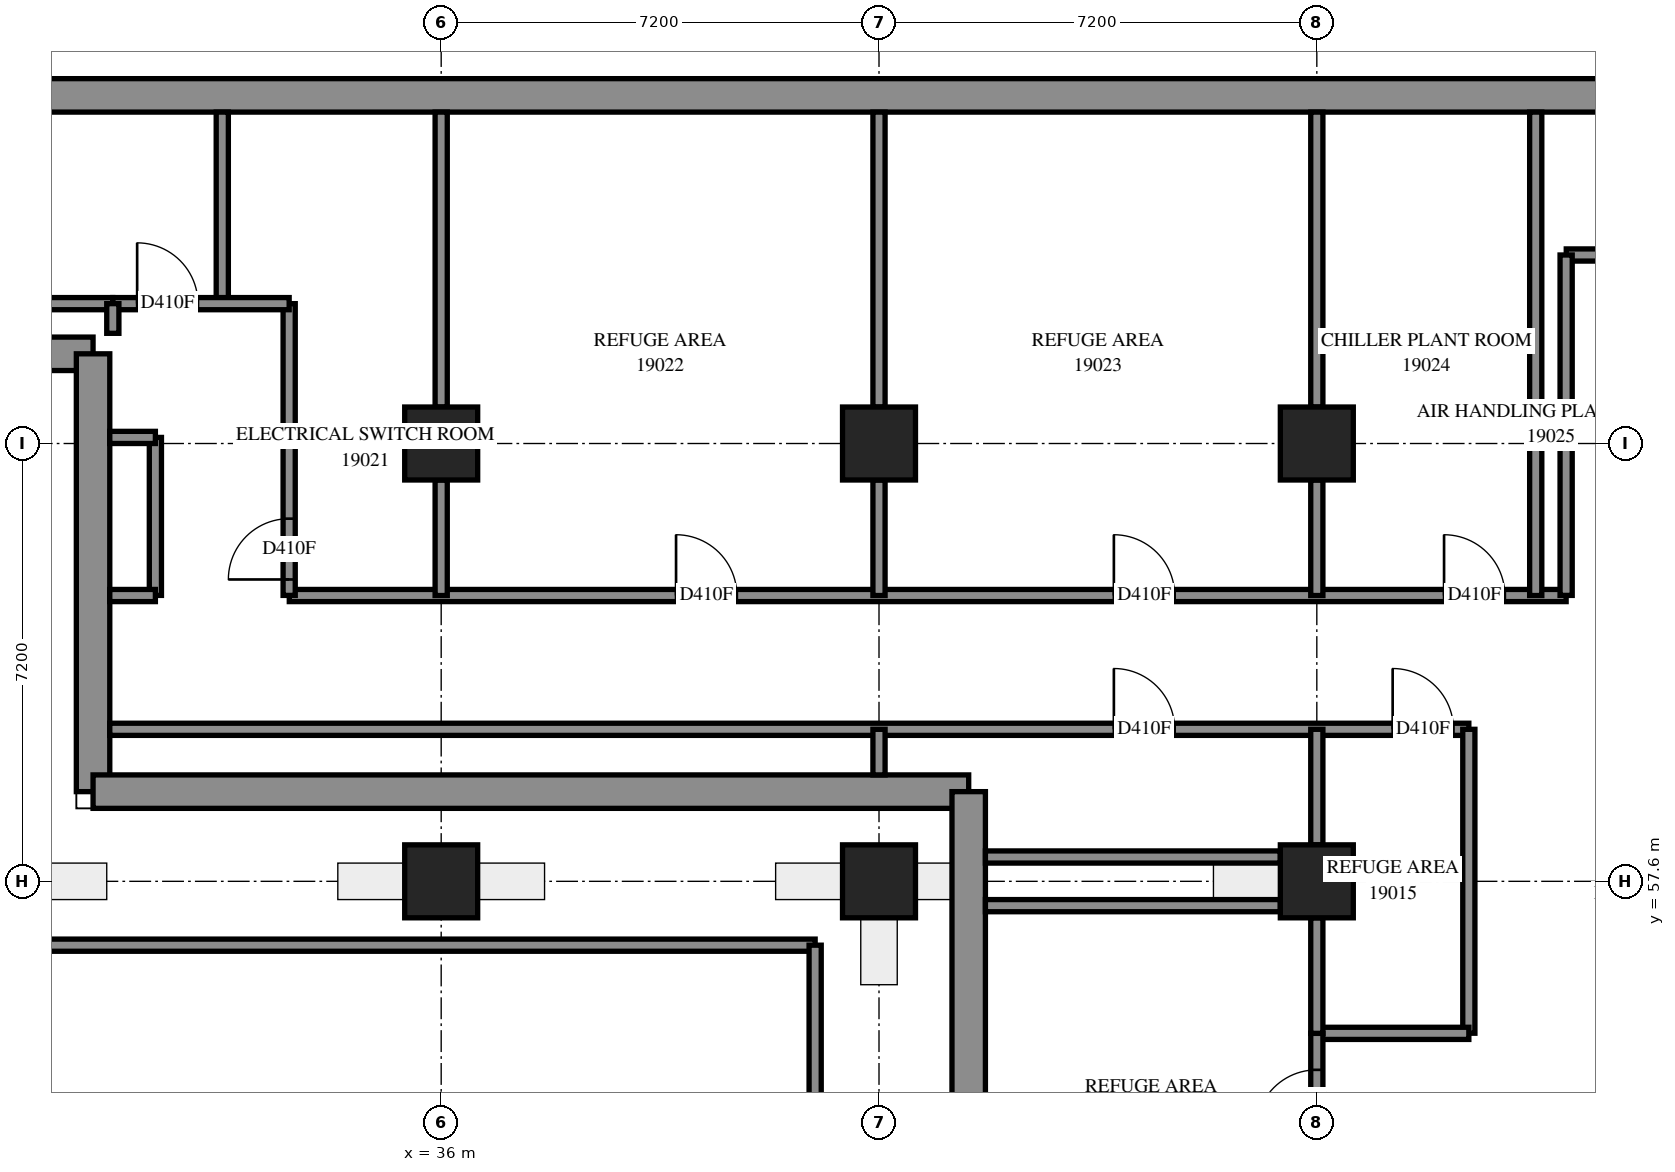
"""IFC4 building model, lengths in metres.
Left out: names, types, materials, properties, quantities, classifications, styles, units other than length and angle.
Written with IfcOpenShell. Run it as: python <this file> out.ifc"""

import sys

from ifc_helpers import new_model, si_unit, direction, frame, frame_2d, origin, origin_2d, place, context, subcontext, project, spatial, polyline, rectangle, outline, extrude, element, fill, save


model = new_model("IFC4")
c1 = context("Model", 3, precision=1e-05, world=origin(), true_north=direction((0.0, 1.0)))
c2 = subcontext(c1, "Body", "Model", "MODEL_VIEW")
j1 = project(units=[si_unit("LENGTHUNIT", "METRE"), si_unit("PLANEANGLEUNIT", "RADIAN")], contexts=[c1])
p1 = place(None, origin())
s1 = spatial("IfcSite", under=j1, at=p1, CompositionType="ELEMENT")
p2 = place(p1, origin())
s2 = spatial("IfcBuilding", under=s1, at=p2, CompositionType="ELEMENT")
p3 = place(p2, frame((0.0, 0.0, 72.0)))
s3 = spatial("IfcBuildingStorey", under=s2, at=p3, CompositionType="ELEMENT", Elevation=72.0)
p4 = place(p3, frame((36.0, 57.6, -0.3), z_axis=(0.0, 0.0, 1.0), x_axis=(1.0, 0.0, 0.0)))
e1 = element("IfcColumn", 1, at=p4, inside=s3, PredefinedType="COLUMN", context=c2, shape_type="SweptSolid", body=[
    extrude(rectangle(XDim=1.2, YDim=1.2, at=origin_2d()), origin(), (0.0, 0.0, 1.0), 5.0),
])
p5 = place(p3, frame((36.0, 64.8, 0.0), z_axis=(0.0, 0.0, 1.0), x_axis=(1.0, 0.0, 0.0)))
e2 = element("IfcColumn", 2, at=p5, inside=s3, PredefinedType="COLUMN", context=c2, shape_type="SweptSolid", body=[
    extrude(rectangle(XDim=1.2, YDim=1.2, at=origin_2d()), origin(), (0.0, 0.0, 1.0), 4.7),
])
p6 = place(p3, frame((43.2, 57.6, -0.3), z_axis=(0.0, 0.0, 1.0), x_axis=(1.0, 0.0, 0.0)))
e3 = element("IfcColumn", 3, at=p6, inside=s3, PredefinedType="COLUMN", context=c2, shape_type="SweptSolid", body=[
    extrude(rectangle(XDim=1.2, YDim=1.2, at=origin_2d()), origin(), (0.0, 0.0, 1.0), 5.0),
])
for number, where, z_axis, x_axis in (
    (4, (43.2, 64.8, 0.0), (0.0, 0.0, 1.0), (1.0, 0.0, 0.0)),
    (5, (50.4, 57.6, 0.0), (0.0, 0.0, 1.0), (1.0, 0.0, 0.0)),
    (6, (50.4, 64.8, 0.0), (0.0, 0.0, 1.0), (1.0, 0.0, 0.0)),
):
    element("IfcColumn", number, at=place(p3, frame(where, z_axis=z_axis, x_axis=x_axis)), inside=s3, PredefinedType="COLUMN", context=c2, shape_type="SweptSolid", body=[
        extrude(rectangle(XDim=1.2, YDim=1.2, at=origin_2d()), origin(), (0.0, 0.0, 1.0), 4.7),
    ])
p7 = place(p3, frame((78.589, 70.525, 0.0), z_axis=(0.0, 0.0, 1.0), x_axis=(-1.0, 0.0, 0.0)))
e7 = element("IfcWall", 7, at=p7, inside=s3, PredefinedType="SOLIDWALL", context=c2, shape_type="SweptSolid", body=[
    extrude(outline(polyline([(-0.114, -0.275), (55.789, -0.275), (55.239, 0.275), (0.114, 0.275), (-0.114, -0.275)])), origin(), (0.0, 0.0, 1.0), 4.7),
])
p8 = place(p3, frame((23.075, 66.275, 0.0), z_axis=(0.0, 0.0, 1.0), x_axis=(1.0, 0.0, 0.0)))
e8 = element("IfcWall", 8, at=p8, inside=s3, PredefinedType="SOLIDWALL", context=c2, shape_type="SweptSolid", body=[
    extrude(outline(polyline([(-0.275, -0.275), (6.925, -0.275), (7.475, 0.275), (0.275, 0.275), (-0.275, -0.275)])), origin(), (0.0, 0.0, 1.0), 4.7),
])
p9 = place(p3, frame((30.275, 66.275, 0.0), z_axis=(0.0, 0.0, 1.0), x_axis=(0.0, -1.0, 0.0)))
e9 = element("IfcWall", 9, at=p9, inside=s3, PredefinedType="SOLIDWALL", context=c2, shape_type="SweptSolid", body=[
    extrude(outline(polyline([(0.275, -0.275), (7.475, -0.275), (6.925, 0.275), (-0.275, 0.275), (0.275, -0.275)])), origin(), (0.0, 0.0, 1.0), 4.7),
])
p10 = place(p3, frame((30.275, 59.075, 0.0), z_axis=(0.0, 0.0, 1.0), x_axis=(1.0, 0.0, 0.0)))
e10 = element("IfcWall", 10, at=p10, inside=s3, PredefinedType="SOLIDWALL", context=c2, shape_type="SweptSolid", body=[
    extrude(outline(polyline([(-0.275, -0.275), (14.125, -0.275), (14.675, 0.275), (0.275, 0.275), (-0.275, -0.275)])), origin(), (0.0, 0.0, 1.0), 4.7),
])
p11 = place(p3, frame((44.675, 59.075, 0.0), z_axis=(0.0, 0.0, 1.0), x_axis=(0.0, -1.0, 0.0)))
e11 = element("IfcWall", 11, at=p11, inside=s3, PredefinedType="SOLIDWALL", context=c2, shape_type="SweptSolid", body=[
    extrude(outline(polyline([(0.275, -0.275), (7.475, -0.275), (6.925, 0.275), (-0.275, 0.275), (0.275, -0.275)])), origin(), (0.0, 0.0, 1.0), 4.7),
])
p12 = place(p3, frame((27.75, 56.55, 0.0), z_axis=(0.0, 0.0, 1.0), x_axis=(1.0, 0.0, 0.0)))
e12 = element("IfcWall", 12, at=p12, inside=s3, PredefinedType="SOLIDWALL", context=c2, shape_type="SweptSolid", body=[
    extrude(outline(polyline([(-0.1, -0.1), (14.3, -0.1), (14.5, 0.1), (0.1, 0.1), (-0.1, -0.1)])), origin(), (0.0, 0.0, 1.0), 4.7),
])
p13 = place(p3, frame((42.15, 56.55, 0.0), z_axis=(0.0, 0.0, 1.0), x_axis=(0.0, -1.0, 0.0)))
e13 = element("IfcWall", 13, at=p13, inside=s3, PredefinedType="SOLIDWALL", context=c2, shape_type="SweptSolid", body=[
    extrude(outline(polyline([(0.1, -0.1), (7.3, -0.1), (7.1, 0.1), (-0.1, 0.1), (0.1, -0.1)])), origin(), (0.0, 0.0, 1.0), 4.7),
])
p14 = place(p3, frame((30.55, 60.1, 0.0), z_axis=(0.0, 0.0, 1.0), x_axis=(1.0, 0.0, 0.0)))
e14 = element("IfcWall", 14, at=p14, inside=s3, PredefinedType="PARTITIONING", context=c2, shape_type="SweptSolid", body=[
    extrude(rectangle(XDim=22.35, YDim=0.2, at=frame_2d((11.175, 0.0))), origin(), (0.0, 0.0, 1.0), 4.7),
])
p15 = place(p14, frame((16.512, 0.0, 0.0)))
e15 = element("IfcOpeningElement", 15, at=p15, cuts=e14, PredefinedType="OPENING", context=c2, shape_type="SweptSolid", body=[
    extrude(rectangle(XDim=1.0, YDim=2.1, at=frame_2d((0.5, 1.05))), frame((0.0, 0.11, 0.0), z_axis=(0.0, -1.0, 0.0), x_axis=(1.0, 0.0, 0.0)), (0.0, 0.0, 1.0), 0.22),
])
p16 = place(p14, frame((21.097, 0.0, 0.0)))
e16 = element("IfcOpeningElement", 16, at=p16, cuts=e14, PredefinedType="OPENING", context=c2, shape_type="SweptSolid", body=[
    extrude(rectangle(XDim=1.0, YDim=2.1, at=frame_2d((0.5, 1.05))), frame((0.0, 0.11, 0.0), z_axis=(0.0, -1.0, 0.0), x_axis=(1.0, 0.0, 0.0)), (0.0, 0.0, 1.0), 0.22),
])
p17 = place(p3, frame((33.502, 62.3, 0.0), z_axis=(0.0, 0.0, 1.0), x_axis=(1.0, 0.0, 0.0)))
e17 = element("IfcWall", 17, at=p17, inside=s3, PredefinedType="PARTITIONING", context=c2, shape_type="SweptSolid", body=[
    extrude(rectangle(XDim=20.998, YDim=0.2, at=frame_2d((10.499, 0.0))), origin(), (0.0, 0.0, 1.0), 4.7),
])
p18 = place(p17, frame((6.361, 0.0, 0.0)))
e18 = element("IfcOpeningElement", 18, at=p18, cuts=e17, PredefinedType="OPENING", context=c2, shape_type="SweptSolid", body=[
    extrude(rectangle(XDim=1.0, YDim=2.1, at=frame_2d((0.5, 1.05))), frame((0.0, 0.11, 0.0), z_axis=(0.0, -1.0, 0.0), x_axis=(1.0, 0.0, 0.0)), (0.0, 0.0, 1.0), 0.22),
])
p19 = place(p17, frame((13.56, 0.0, 0.0)))
e19 = element("IfcOpeningElement", 19, at=p19, cuts=e17, PredefinedType="OPENING", context=c2, shape_type="SweptSolid", body=[
    extrude(rectangle(XDim=1.0, YDim=2.1, at=frame_2d((0.5, 1.05))), frame((0.0, 0.11, 0.0), z_axis=(0.0, -1.0, 0.0), x_axis=(1.0, 0.0, 0.0)), (0.0, 0.0, 1.0), 0.22),
])
p20 = place(p17, frame((18.991, 0.0, 0.0)))
e20 = element("IfcOpeningElement", 20, at=p20, cuts=e17, PredefinedType="OPENING", context=c2, shape_type="SweptSolid", body=[
    extrude(rectangle(XDim=1.0, YDim=2.1, at=frame_2d((0.5, 1.05))), frame((0.0, 0.11, 0.0), z_axis=(0.0, -1.0, 0.0), x_axis=(1.0, 0.0, 0.0)), (0.0, 0.0, 1.0), 0.22),
])
p21 = place(p3, frame((54.502, 67.9, 0.0), z_axis=(0.0, 0.0, 1.0), x_axis=(1.0, 0.0, 0.0)))
e21 = element("IfcWall", 21, at=p21, inside=s3, PredefinedType="PARTITIONING", context=c2, shape_type="SweptSolid", body=[
    extrude(rectangle(XDim=20.598, YDim=0.2, at=frame_2d((10.299, 0.0))), origin(), (0.0, 0.0, 1.0), 4.7),
])
p22 = place(p21, frame((1.871, 0.0, 0.0)))
e22 = element("IfcOpeningElement", 22, at=p22, cuts=e21, PredefinedType="OPENING", context=c2, shape_type="SweptSolid", body=[
    extrude(rectangle(XDim=1.0, YDim=2.1, at=frame_2d((0.5, 1.05))), frame((0.0, 0.11, 0.0), z_axis=(0.0, -1.0, 0.0), x_axis=(1.0, 0.0, 0.0)), (0.0, 0.0, 1.0), 0.22),
])
p23 = place(p21, frame((16.273, 0.0, 0.0)))
e23 = element("IfcOpeningElement", 23, at=p23, cuts=e21, PredefinedType="OPENING", context=c2, shape_type="SweptSolid", body=[
    extrude(rectangle(XDim=1.0, YDim=2.1, at=frame_2d((0.5, 1.05))), frame((0.0, 0.11, 0.0), z_axis=(0.0, -1.0, 0.0), x_axis=(1.0, 0.0, 0.0)), (0.0, 0.0, 1.0), 0.22),
])
p24 = place(p21, frame((9.036, 0.0, 0.0)))
e24 = element("IfcOpeningElement", 24, at=p24, cuts=e21, PredefinedType="OPENING", context=c2, shape_type="SweptSolid", body=[
    extrude(rectangle(XDim=1.0, YDim=2.1, at=frame_2d((0.5, 1.05))), frame((0.0, 0.11, 0.0), z_axis=(0.0, -1.0, 0.0), x_axis=(1.0, 0.0, 0.0)), (0.0, 0.0, 1.0), 0.22),
])
p25 = place(p3, frame((54.0, 62.3, 0.0), z_axis=(0.0, 0.0, 1.0), x_axis=(0.0, 1.0, 0.0)))
e25 = element("IfcWall", 25, at=p25, inside=s3, PredefinedType="PARTITIONING", context=c2, shape_type="SweptSolid", body=[
    extrude(rectangle(XDim=7.95, YDim=0.2, at=frame_2d((3.975, 0.0))), origin(), (0.0, 0.0, 1.0), 4.7),
])
p26 = place(p3, frame((23.35, 67.1, 0.0), z_axis=(0.0, 0.0, 1.0), x_axis=(1.0, 0.0, 0.0)))
e26 = element("IfcWall", 26, at=p26, inside=s3, PredefinedType="PARTITIONING", context=c2, shape_type="SweptSolid", body=[
    extrude(rectangle(XDim=7.25, YDim=0.2, at=frame_2d((3.625, 0.0))), origin(), (0.0, 0.0, 1.0), 4.7),
])
p27 = place(p3, frame((54.5, 62.302, 0.0), z_axis=(0.0, 0.0, 1.0), x_axis=(0.0, 1.0, 0.0)))
e27 = element("IfcWall", 27, at=p27, inside=s3, PredefinedType="PARTITIONING", context=c2, shape_type="SweptSolid", body=[
    extrude(rectangle(XDim=5.598, YDim=0.2, at=frame_2d((2.799, 0.0))), origin(), (0.0, 0.0, 1.0), 4.7),
])
p28 = place(p3, frame((52.9, 55.102, 0.0), z_axis=(0.0, 0.0, 1.0), x_axis=(0.0, 1.0, 0.0)))
e28 = element("IfcWall", 28, at=p28, inside=s3, PredefinedType="PARTITIONING", context=c2, shape_type="SweptSolid", body=[
    extrude(rectangle(XDim=4.998, YDim=0.2, at=frame_2d((2.499, 0.0))), origin(), (0.0, 0.0, 1.0), 4.7),
])
for number, where, z_axis, x_axis in (
    (29, (44.95, 57.2, 0.0), (0.0, 0.0, 1.0), (1.0, 0.0, 0.0)),
    (30, (44.95, 58.0, 0.0), (0.0, 0.0, 1.0), (1.0, 0.0, 0.0)),
    (31, (36.0, 65.4, 0.0), (0.0, 0.0, 1.0), (0.0, 1.0, 0.0)),
    (32, (43.2, 65.4, 0.0), (0.0, 0.0, 1.0), (0.0, 1.0, 0.0)),
    (33, (50.4, 65.4, 0.0), (0.0, 0.0, 1.0), (0.0, 1.0, 0.0)),
):
    element("IfcWall", number, at=place(p3, frame(where, z_axis=z_axis, x_axis=x_axis)), inside=s3, PredefinedType="PARTITIONING", context=c2, shape_type="SweptSolid", body=[
        extrude(rectangle(XDim=4.85, YDim=0.2, at=frame_2d((2.425, 0.0))), origin(), (0.0, 0.0, 1.0), 4.7),
    ])
p29 = place(p3, frame((33.5, 62.302, 0.0), z_axis=(0.0, 0.0, 1.0), x_axis=(0.0, 1.0, 0.0)))
e34 = element("IfcWall", 34, at=p29, inside=s3, PredefinedType="PARTITIONING", context=c2, shape_type="SweptSolid", body=[
    extrude(rectangle(XDim=4.798, YDim=0.2, at=frame_2d((2.399, 0.0))), origin(), (0.0, 0.0, 1.0), 4.7),
])
p30 = place(p29, frame((0.262, 0.0, 0.0)))
e35 = element("IfcOpeningElement", 35, at=p30, cuts=e34, PredefinedType="OPENING", context=c2, shape_type="SweptSolid", body=[
    extrude(rectangle(XDim=1.0, YDim=2.1, at=frame_2d((0.5, 1.05))), frame((0.0, 0.11, 0.0), z_axis=(0.0, -1.0, 0.0), x_axis=(1.0, 0.0, 0.0)), (0.0, 0.0, 1.0), 0.22),
])
p31 = place(p3, frame((32.4, 67.1, 0.0), z_axis=(0.0, 0.0, 1.0), x_axis=(0.0, 1.0, 0.0)))
e36 = element("IfcWall", 36, at=p31, inside=s3, PredefinedType="PARTITIONING", context=c2, shape_type="SweptSolid", body=[
    extrude(rectangle(XDim=3.15, YDim=0.2, at=frame_2d((1.575, 0.0))), origin(), (0.0, 0.0, 1.0), 4.7),
])
p32 = place(p3, frame((30.6, 67.1, 0.0), z_axis=(0.0, 0.0, 1.0), x_axis=(1.0, 0.0, 0.0)))
e37 = element("IfcWall", 37, at=p32, inside=s3, PredefinedType="PARTITIONING", context=c2, shape_type="SweptSolid", body=[
    extrude(rectangle(XDim=2.9, YDim=0.2, at=frame_2d((1.45, 0.0))), origin(), (0.0, 0.0, 1.0), 4.7),
])
p33 = place(p32, frame((0.4, 0.0, 0.0)))
e38 = element("IfcOpeningElement", 38, at=p33, cuts=e37, PredefinedType="OPENING", context=c2, shape_type="SweptSolid", body=[
    extrude(rectangle(XDim=1.0, YDim=2.1, at=frame_2d((0.5, 1.05))), frame((0.0, 0.11, 0.0), z_axis=(0.0, -1.0, 0.0), x_axis=(1.0, 0.0, 0.0)), (0.0, 0.0, 1.0), 0.22),
])
p34 = place(p3, frame((31.3, 62.302, 0.0), z_axis=(0.0, 0.0, 1.0), x_axis=(0.0, 1.0, 0.0)))
e39 = element("IfcWall", 39, at=p34, inside=s3, PredefinedType="PARTITIONING", context=c2, shape_type="SweptSolid", body=[
    extrude(rectangle(XDim=2.598, YDim=0.2, at=frame_2d((1.299, 0.0))), origin(), (0.0, 0.0, 1.0), 4.7),
])
p35 = place(p3, frame((50.4, 55.1, 0.0), z_axis=(0.0, 0.0, 1.0), x_axis=(1.0, 0.0, 0.0)))
e40 = element("IfcWall", 40, at=p35, inside=s3, PredefinedType="PARTITIONING", context=c2, shape_type="SweptSolid", body=[
    extrude(rectangle(XDim=2.5, YDim=0.2, at=frame_2d((1.25, 0.0))), origin(), (0.0, 0.0, 1.0), 4.7),
])
p36 = place(p3, frame((50.4, 52.9, 0.0), z_axis=(0.0, 0.0, 1.0), x_axis=(0.0, 1.0, 0.0)))
e41 = element("IfcWall", 41, at=p36, inside=s3, PredefinedType="PARTITIONING", context=c2, shape_type="SweptSolid", body=[
    extrude(rectangle(XDim=2.2, YDim=0.2, at=frame_2d((1.1, 0.0))), origin(), (0.0, 0.0, 1.0), 4.7),
])
p37 = place(p36, frame((0.6, 0.0, 0.0)))
e42 = element("IfcOpeningElement", 42, at=p37, cuts=e41, PredefinedType="OPENING", context=c2, shape_type="SweptSolid", body=[
    extrude(rectangle(XDim=1.0, YDim=2.1, at=frame_2d((0.5, 1.05))), frame((0.0, 0.11, 0.0), z_axis=(0.0, -1.0, 0.0), x_axis=(1.0, 0.0, 0.0)), (0.0, 0.0, 1.0), 0.22),
])
for number, where, z_axis, x_axis in (
    (43, (36.0, 62.3, 0.0), (0.0, 0.0, 1.0), (0.0, 1.0, 0.0)),
    (44, (43.2, 62.3, 0.0), (0.0, 0.0, 1.0), (0.0, 1.0, 0.0)),
    (45, (50.4, 62.3, 0.0), (0.0, 0.0, 1.0), (0.0, 1.0, 0.0)),
    (46, (50.4, 55.1, 0.0), (0.0, 0.0, 1.0), (0.0, 1.0, 0.0)),
    (47, (50.4, 58.2, 0.0), (0.0, 0.0, 1.0), (0.0, 1.0, 0.0)),
):
    element("IfcWall", number, at=place(p3, frame(where, z_axis=z_axis, x_axis=x_axis)), inside=s3, PredefinedType="PARTITIONING", context=c2, shape_type="SweptSolid", body=[
        extrude(rectangle(XDim=1.9, YDim=0.2, at=frame_2d((0.95, 0.0))), origin(), (0.0, 0.0, 1.0), 4.7),
    ])
for number, where, z_axis, x_axis in (
    (48, (43.2, 59.35, 0.0), (0.0, 0.0, 1.0), (0.0, 1.0, 0.0)),
    (49, (30.55, 62.3, 0.0), (0.0, 0.0, 1.0), (1.0, 0.0, 0.0)),
    (50, (30.55, 64.9, 0.0), (0.0, 0.0, 1.0), (1.0, 0.0, 0.0)),
):
    element("IfcWall", number, at=place(p3, frame(where, z_axis=z_axis, x_axis=x_axis)), inside=s3, PredefinedType="PARTITIONING", context=c2, shape_type="SweptSolid", body=[
        extrude(rectangle(XDim=0.75, YDim=0.2, at=frame_2d((0.375, 0.0))), origin(), (0.0, 0.0, 1.0), 4.7),
    ])
p38 = place(p3, frame((30.6, 66.612, 0.0), z_axis=(0.0, 0.0, 1.0), x_axis=(0.0, 1.0, 0.0)))
e51 = element("IfcWall", 51, at=p38, inside=s3, PredefinedType="PARTITIONING", context=c2, shape_type="SweptSolid", body=[
    extrude(rectangle(XDim=0.488, YDim=0.2, at=frame_2d((0.244, 0.0))), origin(), (0.0, 0.0, 1.0), 4.7),
])
p39 = place(p15, origin())
e52 = element("IfcDoor", 52, at=p39, inside=s3, OperationType="SINGLE_SWING_LEFT", PredefinedType="DOOR", context=c2, shape_type="SweptSolid", body=[
    extrude(rectangle(XDim=1.0, YDim=2.1, at=frame_2d((0.5, 1.05))), frame((0.0, 0.025, 0.0), z_axis=(0.0, -1.0, 0.0), x_axis=(1.0, 0.0, 0.0)), (0.0, 0.0, 1.0), 0.05),
])
fill(e15, e52)
p40 = place(p16, origin())
e53 = element("IfcDoor", 53, at=p40, inside=s3, OperationType="SINGLE_SWING_LEFT", PredefinedType="DOOR", context=c2, shape_type="SweptSolid", body=[
    extrude(rectangle(XDim=1.0, YDim=2.1, at=frame_2d((0.5, 1.05))), frame((0.0, 0.025, 0.0), z_axis=(0.0, -1.0, 0.0), x_axis=(1.0, 0.0, 0.0)), (0.0, 0.0, 1.0), 0.05),
])
fill(e16, e53)
p41 = place(p33, origin())
e54 = element("IfcDoor", 54, at=p41, inside=s3, OperationType="SINGLE_SWING_RIGHT", PredefinedType="DOOR", context=c2, shape_type="SweptSolid", body=[
    extrude(rectangle(XDim=1.0, YDim=2.1, at=frame_2d((0.5, 1.05))), frame((0.0, 0.025, 0.0), z_axis=(0.0, -1.0, 0.0), x_axis=(1.0, 0.0, 0.0)), (0.0, 0.0, 1.0), 0.05),
])
fill(e38, e54)
p42 = place(p30, origin())
e55 = element("IfcDoor", 55, at=p42, inside=s3, OperationType="SINGLE_SWING_LEFT", PredefinedType="DOOR", context=c2, shape_type="SweptSolid", body=[
    extrude(rectangle(XDim=1.0, YDim=2.1, at=frame_2d((0.5, 1.05))), frame((0.0, 0.025, 0.0), z_axis=(0.0, -1.0, 0.0), x_axis=(1.0, 0.0, 0.0)), (0.0, 0.0, 1.0), 0.05),
])
fill(e35, e55)
p43 = place(p18, origin())
e56 = element("IfcDoor", 56, at=p43, inside=s3, OperationType="SINGLE_SWING_RIGHT", PredefinedType="DOOR", context=c2, shape_type="SweptSolid", body=[
    extrude(rectangle(XDim=1.0, YDim=2.1, at=frame_2d((0.5, 1.05))), frame((0.0, 0.025, 0.0), z_axis=(0.0, -1.0, 0.0), x_axis=(1.0, 0.0, 0.0)), (0.0, 0.0, 1.0), 0.05),
])
fill(e18, e56)
p44 = place(p19, origin())
e57 = element("IfcDoor", 57, at=p44, inside=s3, OperationType="SINGLE_SWING_RIGHT", PredefinedType="DOOR", context=c2, shape_type="SweptSolid", body=[
    extrude(rectangle(XDim=1.0, YDim=2.1, at=frame_2d((0.5, 1.05))), frame((0.0, 0.025, 0.0), z_axis=(0.0, -1.0, 0.0), x_axis=(1.0, 0.0, 0.0)), (0.0, 0.0, 1.0), 0.05),
])
fill(e19, e57)
p45 = place(p20, origin())
e58 = element("IfcDoor", 58, at=p45, inside=s3, OperationType="SINGLE_SWING_RIGHT", PredefinedType="DOOR", context=c2, shape_type="SweptSolid", body=[
    extrude(rectangle(XDim=1.0, YDim=2.1, at=frame_2d((0.5, 1.05))), frame((0.0, 0.025, 0.0), z_axis=(0.0, -1.0, 0.0), x_axis=(1.0, 0.0, 0.0)), (0.0, 0.0, 1.0), 0.05),
])
fill(e20, e58)
p46 = place(p37, origin())
e59 = element("IfcDoor", 59, at=p46, inside=s3, OperationType="SINGLE_SWING_LEFT", PredefinedType="DOOR", context=c2, shape_type="SweptSolid", body=[
    extrude(rectangle(XDim=1.0, YDim=2.1, at=frame_2d((0.5, 1.05))), frame((0.0, 0.025, 0.0), z_axis=(0.0, -1.0, 0.0), x_axis=(1.0, 0.0, 0.0)), (0.0, 0.0, 1.0), 0.05),
])
fill(e42, e59)
save(model, sys.argv[1])
